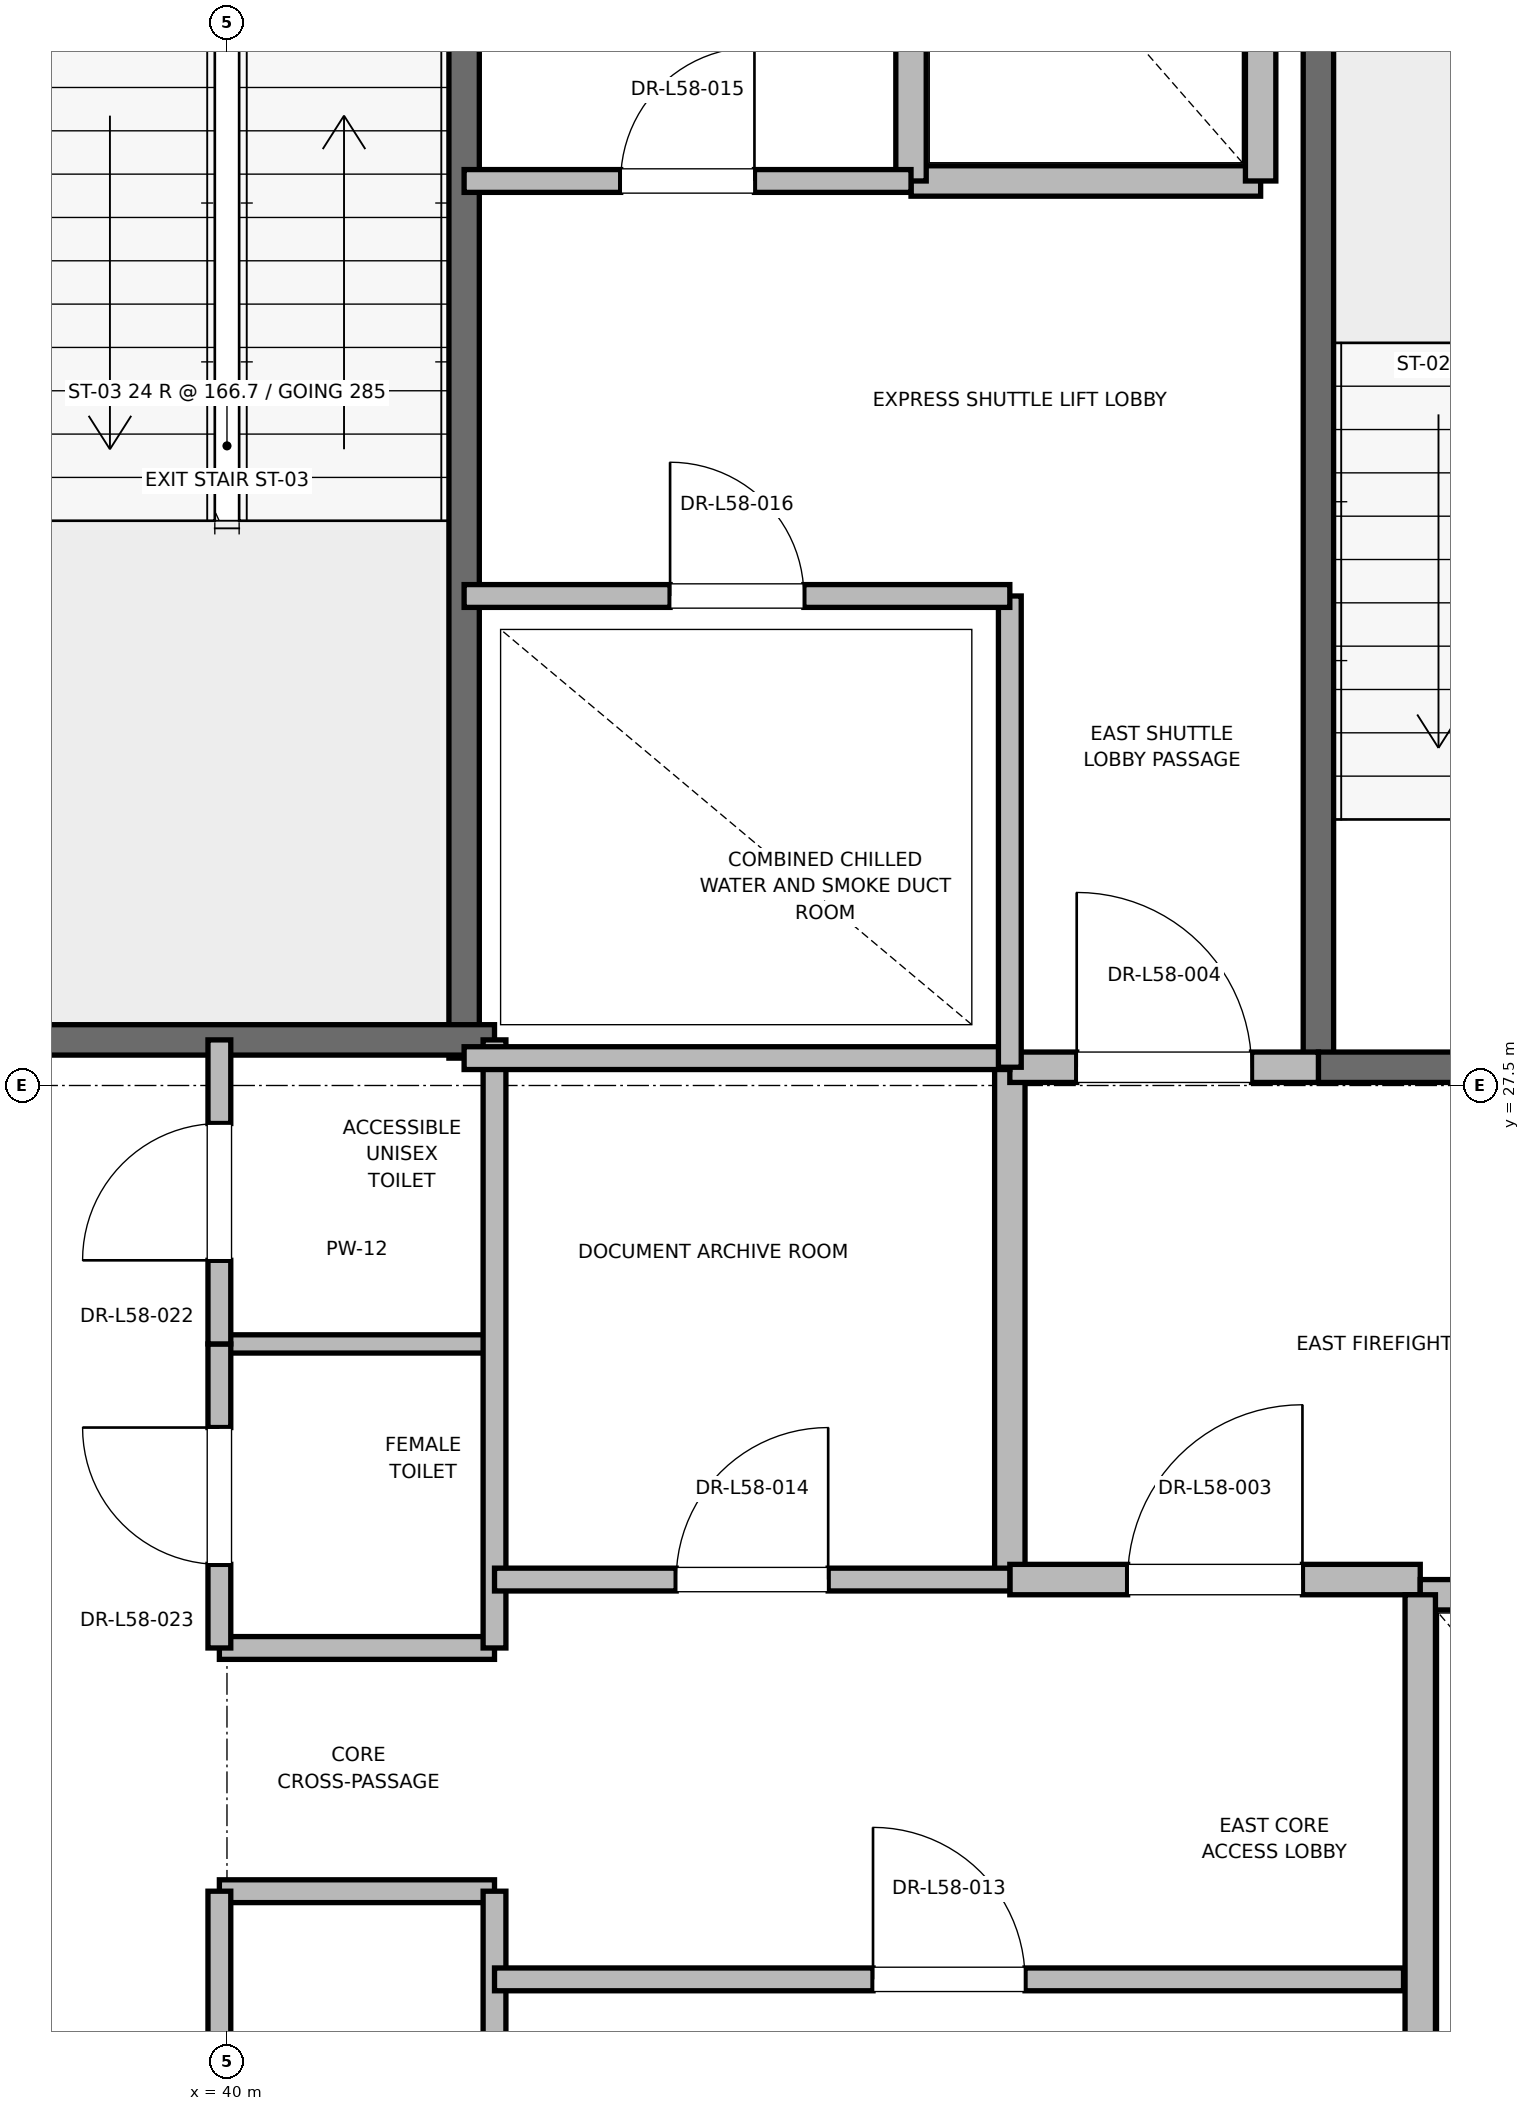
"""IFC4 building model, lengths in metres.
Left out: names, types, materials, properties, quantities, classifications, styles, units other than length and angle.
Written with IfcOpenShell. Run it as: python <this file> out.ifc"""

import sys

from ifc_helpers import new_model, si_unit, direction, frame, frame_2d, origin, place, context, subcontext, project, spatial, rectangle, extrude, element, fill, save


model = new_model("IFC4")
c1 = context("Model", 3, precision=1e-05, world=origin(), true_north=direction((0.0, 1.0)))
c2 = subcontext(c1, "Body", "Model", "MODEL_VIEW")
j1 = project(units=[si_unit("LENGTHUNIT", "METRE"), si_unit("PLANEANGLEUNIT", "RADIAN")], contexts=[c1])
p1 = place(None, origin())
s1 = spatial("IfcSite", under=j1, at=p1, CompositionType="ELEMENT")
p2 = place(p1, origin())
s2 = spatial("IfcBuilding", under=s1, at=p2, CompositionType="ELEMENT")
p3 = place(p2, frame((0.0, 0.0, 251.2)))
s3 = spatial("IfcBuildingStorey", under=s2, at=p3, CompositionType="ELEMENT", Elevation=251.2)
p4 = place(p3, frame((47.18, 27.62, 0.0), z_axis=(0.0, 0.0, 1.0), x_axis=(0.0, 1.0, 0.0)))
e1 = element("IfcWall", 1, at=p4, inside=s3, PredefinedType="SOLIDWALL", context=c2, shape_type="SweptSolid", body=[
    extrude(rectangle(XDim=8.18, YDim=0.2, at=frame_2d((4.09, 0.0))), origin(), (0.0, 0.0, 1.0), 3.785),
])
p5 = place(p3, frame((47.18, 27.62, 0.0), z_axis=(0.0, 0.0, 1.0), x_axis=(1.0, 0.0, 0.0)))
e2 = element("IfcWall", 2, at=p5, inside=s3, PredefinedType="SOLIDWALL", context=c2, shape_type="SweptSolid", body=[
    extrude(rectangle(XDim=3.12, YDim=0.2, at=frame_2d((1.56, 0.0))), origin(), (0.0, 0.0, 1.0), 3.785),
])
p6 = place(p5, frame((1.01, 0.0, 0.0)))
e3 = element("IfcOpeningElement", 3, at=p6, cuts=e2, PredefinedType="OPENING", context=c2, shape_type="SweptSolid", body=[
    extrude(rectangle(XDim=1.1, YDim=2.15, at=frame_2d((0.55, 1.075))), frame((0.0, 0.1, 0.0), z_axis=(0.0, -1.0, 0.0), x_axis=(1.0, 0.0, 0.0)), (0.0, 0.0, 1.0), 0.2),
])
p7 = place(p3, frame((41.56, 27.68, 0.0), z_axis=(0.0, 0.0, 1.0), x_axis=(0.0, 1.0, 0.0)))
e4 = element("IfcWall", 4, at=p7, inside=s3, PredefinedType="SOLIDWALL", context=c2, shape_type="SweptSolid", body=[
    extrude(rectangle(XDim=8.57, YDim=0.2, at=frame_2d((4.285, 0.0))), origin(), (0.0, 0.0, 1.0), 3.785),
])
p8 = place(p3, frame((38.44, 27.8, 0.0), z_axis=(0.0, 0.0, 1.0), x_axis=(1.0, 0.0, 0.0)))
e5 = element("IfcWall", 5, at=p8, inside=s3, PredefinedType="SOLIDWALL", context=c2, shape_type="SweptSolid", body=[
    extrude(rectangle(XDim=3.32, YDim=0.2, at=frame_2d((1.66, 0.0))), origin(), (0.0, 0.0, 1.0), 3.785),
])
p9 = place(p3, frame((45.15, 24.25, 0.0), z_axis=(0.0, 0.0, 1.0), x_axis=(0.0, 1.0, 0.0)))
e6 = element("IfcWall", 6, at=p9, inside=s3, PredefinedType="PARTITIONING", context=c2, shape_type="SweptSolid", body=[
    extrude(rectangle(XDim=3.37, YDim=0.2, at=frame_2d((1.685, 0.0))), origin(), (0.0, 0.0, 1.0), 3.785),
])
p10 = place(p3, frame((45.15, 24.25, 0.0), z_axis=(0.0, 0.0, 1.0), x_axis=(1.0, 0.0, 0.0)))
e7 = element("IfcWall", 7, at=p10, inside=s3, PredefinedType="PARTITIONING", context=c2, shape_type="SweptSolid", body=[
    extrude(rectangle(XDim=2.7, YDim=0.2, at=frame_2d((1.35, 0.0))), origin(), (0.0, 0.0, 1.0), 3.785),
])
p11 = place(p10, frame((0.775, 0.0, 0.0)))
e8 = element("IfcOpeningElement", 8, at=p11, cuts=e7, PredefinedType="OPENING", context=c2, shape_type="SweptSolid", body=[
    extrude(rectangle(XDim=1.15, YDim=2.2, at=frame_2d((0.575, 1.1))), frame((0.0, 0.1, 0.0), z_axis=(0.0, -1.0, 0.0), x_axis=(1.0, 0.0, 0.0)), (0.0, 0.0, 1.0), 0.2),
])
p12 = place(p3, frame((45.15, 27.62, 0.0), z_axis=(0.0, 0.0, 1.0), x_axis=(1.0, 0.0, 0.0)))
e9 = element("IfcWall", 9, at=p12, inside=s3, PredefinedType="PARTITIONING", context=c2, shape_type="SweptSolid", body=[
    extrude(rectangle(XDim=2.03, YDim=0.2, at=frame_2d((1.015, 0.0))), origin(), (0.0, 0.0, 1.0), 3.785),
])
p13 = place(p12, frame((0.44, 0.0, 0.0)))
e10 = element("IfcOpeningElement", 10, at=p13, cuts=e9, PredefinedType="OPENING", context=c2, shape_type="SweptSolid", body=[
    extrude(rectangle(XDim=1.15, YDim=2.2, at=frame_2d((0.575, 1.1))), frame((0.0, 0.1, 0.0), z_axis=(0.0, -1.0, 0.0), x_axis=(1.0, 0.0, 0.0)), (0.0, 0.0, 1.0), 0.2),
])
p14 = place(p3, frame((50.45, 24.15, 0.0), z_axis=(0.0, 0.0, 1.0), x_axis=(-1.0, 0.0, 0.0)))
e11 = element("IfcWall", 11, at=p14, inside=s3, PredefinedType="SOLIDWALL", context=c2, shape_type="SweptSolid", body=[
    extrude(rectangle(XDim=2.6, YDim=0.2, at=frame_2d((1.3, 0.0))), origin(), (0.0, 0.0, 1.0), 2.865),
])
p15 = place(p14, frame((0.75, 0.0, 0.0)))
e12 = element("IfcOpeningElement", 12, at=p15, cuts=e11, PredefinedType="OPENING", context=c2, shape_type="SweptSolid", body=[
    extrude(rectangle(XDim=1.1, YDim=2.2, at=frame_2d((0.55, 1.1))), frame((0.0, 0.1, 0.0), z_axis=(0.0, -1.0, 0.0), x_axis=(1.0, 0.0, 0.0)), (0.0, 0.0, 1.0), 0.2),
])
p16 = place(p3, frame((47.85, 24.15, 0.0), z_axis=(0.0, 0.0, 1.0), x_axis=(0.0, -1.0, 0.0)))
e13 = element("IfcWall", 13, at=p16, inside=s3, PredefinedType="SOLIDWALL", context=c2, shape_type="SweptSolid", body=[
    extrude(rectangle(XDim=3.0, YDim=0.2, at=frame_2d((1.5, 0.0))), origin(), (0.0, 0.0, 1.0), 3.785),
])
p17 = place(p3, frame((44.5, 33.45, 0.0), z_axis=(0.0, 0.0, 1.0), x_axis=(1.0, 0.0, 0.0)))
e14 = element("IfcWall", 14, at=p17, inside=s3, PredefinedType="SOLIDWALL", context=c2, shape_type="SweptSolid", body=[
    extrude(rectangle(XDim=2.3, YDim=0.2, at=frame_2d((1.15, 0.0))), origin(), (0.0, 0.0, 1.0), 3.785),
])
p18 = place(p3, frame((44.5, 36.05, 0.0), z_axis=(0.0, 0.0, 1.0), x_axis=(0.0, -1.0, 0.0)))
e15 = element("IfcWall", 15, at=p18, inside=s3, PredefinedType="SOLIDWALL", context=c2, shape_type="SweptSolid", body=[
    extrude(rectangle(XDim=2.6, YDim=0.2, at=frame_2d((1.3, 0.0))), origin(), (0.0, 0.0, 1.0), 2.865),
])
p19 = place(p3, frame((46.8, 33.45, 0.0), z_axis=(0.0, 0.0, 1.0), x_axis=(0.0, 1.0, 0.0)))
e16 = element("IfcWall", 16, at=p19, inside=s3, PredefinedType="SOLIDWALL", context=c2, shape_type="SweptSolid", body=[
    extrude(rectangle(XDim=2.6, YDim=0.2, at=frame_2d((1.3, 0.0))), origin(), (0.0, 0.0, 1.0), 3.785),
])
for number, where, z_axis, x_axis in (
    (17, (39.95, 22.2, 0.0), (0.0, 0.0, 1.0), (1.0, 0.0, 0.0)),
    (18, (39.95, 23.8, 0.0), (0.0, 0.0, 1.0), (1.0, 0.0, 0.0)),
):
    element("IfcWall", number, at=place(p3, frame(where, z_axis=z_axis, x_axis=x_axis)), inside=s3, PredefinedType="PARTITIONING", context=c2, shape_type="SweptSolid", body=[
        extrude(rectangle(XDim=1.81, YDim=0.15, at=frame_2d((0.905, 0.0))), origin(), (0.0, 0.0, 1.0), 2.85),
    ])
p20 = place(p3, frame((39.95, 25.8, 0.0), z_axis=(0.0, 0.0, 1.0), x_axis=(1.0, 0.0, 0.0)))
e19 = element("IfcWall", 19, at=p20, inside=s3, PredefinedType="PARTITIONING", context=c2, shape_type="SweptSolid", body=[
    extrude(rectangle(XDim=1.81, YDim=0.12, at=frame_2d((0.905, 0.0))), origin(), (0.0, 0.0, 1.0), 2.85),
])
p21 = place(p3, frame((41.76, 18.6, 0.0), z_axis=(0.0, 0.0, 1.0), x_axis=(0.0, 1.0, 0.0)))
e20 = element("IfcWall", 20, at=p21, inside=s3, PredefinedType="PARTITIONING", context=c2, shape_type="SweptSolid", body=[
    extrude(rectangle(XDim=3.6, YDim=0.15, at=frame_2d((1.8, 0.0))), origin(), (0.0, 0.0, 1.0), 2.85),
])
p22 = place(p3, frame((41.76, 23.8, 0.0), z_axis=(0.0, 0.0, 1.0), x_axis=(0.0, 1.0, 0.0)))
e21 = element("IfcWall", 21, at=p22, inside=s3, PredefinedType="PARTITIONING", context=c2, shape_type="SweptSolid", body=[
    extrude(rectangle(XDim=4.0, YDim=0.15, at=frame_2d((2.0, 0.0))), origin(), (0.0, 0.0, 1.0), 2.85),
])
p23 = place(p3, frame((39.95, 19.2, 0.0), z_axis=(0.0, 0.0, 1.0), x_axis=(0.0, 1.0, 0.0)))
e22 = element("IfcWall", 22, at=p23, inside=s3, PredefinedType="PARTITIONING", context=c2, shape_type="SweptSolid", body=[
    extrude(rectangle(XDim=3.0, YDim=0.15, at=frame_2d((1.5, 0.0))), origin(), (0.0, 0.0, 1.0), 2.85),
])
p24 = place(p23, frame((1.05, 0.0, 0.0)))
e23 = element("IfcOpeningElement", 23, at=p24, cuts=e22, PredefinedType="OPENING", context=c2, shape_type="SweptSolid", body=[
    extrude(rectangle(XDim=0.9, YDim=2.1, at=frame_2d((0.45, 1.05))), frame((0.0, 0.075, 0.0), z_axis=(0.0, -1.0, 0.0), x_axis=(1.0, 0.0, 0.0)), (0.0, 0.0, 1.0), 0.15),
])
p25 = place(p3, frame((39.95, 23.8, 0.0), z_axis=(0.0, 0.0, 1.0), x_axis=(0.0, 1.0, 0.0)))
e24 = element("IfcWall", 24, at=p25, inside=s3, PredefinedType="PARTITIONING", context=c2, shape_type="SweptSolid", body=[
    extrude(rectangle(XDim=2.0, YDim=0.15, at=frame_2d((1.0, 0.0))), origin(), (0.0, 0.0, 1.0), 2.85),
])
p26 = place(p25, frame((0.55, 0.0, 0.0)))
e25 = element("IfcOpeningElement", 25, at=p26, cuts=e24, PredefinedType="OPENING", context=c2, shape_type="SweptSolid", body=[
    extrude(rectangle(XDim=0.9, YDim=2.1, at=frame_2d((0.45, 1.05))), frame((0.0, 0.075, 0.0), z_axis=(0.0, -1.0, 0.0), x_axis=(1.0, 0.0, 0.0)), (0.0, 0.0, 1.0), 0.15),
])
p27 = place(p3, frame((39.95, 25.8, 0.0), z_axis=(0.0, 0.0, 1.0), x_axis=(0.0, 1.0, 0.0)))
e26 = element("IfcWall", 26, at=p27, inside=s3, PredefinedType="PARTITIONING", context=c2, shape_type="SweptSolid", body=[
    extrude(rectangle(XDim=2.0, YDim=0.15, at=frame_2d((1.0, 0.0))), origin(), (0.0, 0.0, 1.0), 2.85),
])
p28 = place(p27, frame((0.55, 0.0, 0.0)))
e27 = element("IfcOpeningElement", 27, at=p28, cuts=e26, PredefinedType="OPENING", context=c2, shape_type="SweptSolid", body=[
    extrude(rectangle(XDim=0.9, YDim=2.1, at=frame_2d((0.45, 1.05))), frame((0.0, 0.075, 0.0), z_axis=(0.0, -1.0, 0.0), x_axis=(1.0, 0.0, 0.0)), (0.0, 0.0, 1.0), 0.15),
])
p29 = place(p3, frame((41.56, 27.68, 0.0), z_axis=(0.0, 0.0, 1.0), x_axis=(1.0, 0.0, 0.0)))
e28 = element("IfcWall", 28, at=p29, inside=s3, PredefinedType="PARTITIONING", context=c2, shape_type="SweptSolid", body=[
    extrude(rectangle(XDim=3.59, YDim=0.15, at=frame_2d((1.795, 0.0))), origin(), (0.0, 0.0, 1.0), 2.85),
])
p30 = place(p3, frame((41.76, 21.62, 0.0), z_axis=(0.0, 0.0, 1.0), x_axis=(1.0, 0.0, 0.0)))
e29 = element("IfcWall", 29, at=p30, inside=s3, PredefinedType="PARTITIONING", context=c2, shape_type="SweptSolid", body=[
    extrude(rectangle(XDim=5.98, YDim=0.15, at=frame_2d((2.99, 0.0))), origin(), (0.0, 0.0, 1.0), 2.85),
])
p31 = place(p30, frame((2.49, 0.0, 0.0)))
e30 = element("IfcOpeningElement", 30, at=p31, cuts=e29, PredefinedType="OPENING", context=c2, shape_type="SweptSolid", body=[
    extrude(rectangle(XDim=1.0, YDim=2.15, at=frame_2d((0.5, 1.075))), frame((0.0, 0.075, 0.0), z_axis=(0.0, -1.0, 0.0), x_axis=(1.0, 0.0, 0.0)), (0.0, 0.0, 1.0), 0.15),
])
p32 = place(p3, frame((41.76, 24.25, 0.0), z_axis=(0.0, 0.0, 1.0), x_axis=(1.0, 0.0, 0.0)))
e31 = element("IfcWall", 31, at=p32, inside=s3, PredefinedType="PARTITIONING", context=c2, shape_type="SweptSolid", body=[
    extrude(rectangle(XDim=3.39, YDim=0.15, at=frame_2d((1.695, 0.0))), origin(), (0.0, 0.0, 1.0), 2.85),
])
p33 = place(p32, frame((1.195, 0.0, 0.0)))
e32 = element("IfcOpeningElement", 32, at=p33, cuts=e31, PredefinedType="OPENING", context=c2, shape_type="SweptSolid", body=[
    extrude(rectangle(XDim=1.0, YDim=2.15, at=frame_2d((0.5, 1.075))), frame((0.0, 0.075, 0.0), z_axis=(0.0, -1.0, 0.0), x_axis=(1.0, 0.0, 0.0)), (0.0, 0.0, 1.0), 0.15),
])
p34 = place(p3, frame((45.15, 27.62, 0.0), z_axis=(0.0, 0.0, 1.0), x_axis=(0.0, 1.0, 0.0)))
e33 = element("IfcWall", 33, at=p34, inside=s3, PredefinedType="PARTITIONING", context=c2, shape_type="SweptSolid", body=[
    extrude(rectangle(XDim=3.1, YDim=0.15, at=frame_2d((1.55, 0.0))), origin(), (0.0, 0.0, 1.0), 2.85),
])
p35 = place(p3, frame((41.56, 30.72, 0.0), z_axis=(0.0, 0.0, 1.0), x_axis=(1.0, 0.0, 0.0)))
e34 = element("IfcWall", 34, at=p35, inside=s3, PredefinedType="PARTITIONING", context=c2, shape_type="SweptSolid", body=[
    extrude(rectangle(XDim=3.59, YDim=0.15, at=frame_2d((1.795, 0.0))), origin(), (0.0, 0.0, 1.0), 2.85),
])
p36 = place(p35, frame((1.355, 0.0, 0.0)))
e35 = element("IfcOpeningElement", 35, at=p36, cuts=e34, PredefinedType="OPENING", context=c2, shape_type="SweptSolid", body=[
    extrude(rectangle(XDim=0.88, YDim=2.1, at=frame_2d((0.44, 1.05))), frame((0.0, 0.075, 0.0), z_axis=(0.0, -1.0, 0.0), x_axis=(1.0, 0.0, 0.0)), (0.0, 0.0, 1.0), 0.15),
])
p37 = place(p3, frame((41.56, 33.45, 0.0), z_axis=(0.0, 0.0, 1.0), x_axis=(1.0, 0.0, 0.0)))
e36 = element("IfcWall", 36, at=p37, inside=s3, PredefinedType="PARTITIONING", context=c2, shape_type="SweptSolid", body=[
    extrude(rectangle(XDim=2.94, YDim=0.15, at=frame_2d((1.47, 0.0))), origin(), (0.0, 0.0, 1.0), 2.85),
])
p38 = place(p37, frame((1.03, 0.0, 0.0)))
e37 = element("IfcOpeningElement", 37, at=p38, cuts=e36, PredefinedType="OPENING", context=c2, shape_type="SweptSolid", body=[
    extrude(rectangle(XDim=0.88, YDim=2.1, at=frame_2d((0.44, 1.05))), frame((0.0, 0.075, 0.0), z_axis=(0.0, -1.0, 0.0), x_axis=(1.0, 0.0, 0.0)), (0.0, 0.0, 1.0), 0.15),
])
p39 = place(p11, origin())
e38 = element("IfcDoor", 38, at=p39, inside=s3, OperationType="SINGLE_SWING_RIGHT", PredefinedType="DOOR", context=c2, shape_type="SweptSolid", body=[
    extrude(rectangle(XDim=1.15, YDim=2.2, at=frame_2d((0.575, 1.1))), frame((0.0, 0.025, 0.0), z_axis=(0.0, -1.0, 0.0), x_axis=(1.0, 0.0, 0.0)), (0.0, 0.0, 1.0), 0.05),
])
fill(e8, e38)
p40 = place(p13, origin())
e39 = element("IfcDoor", 39, at=p40, inside=s3, OperationType="SINGLE_SWING_LEFT", PredefinedType="DOOR", context=c2, shape_type="SweptSolid", body=[
    extrude(rectangle(XDim=1.15, YDim=2.2, at=frame_2d((0.575, 1.1))), frame((0.0, 0.025, 0.0), z_axis=(0.0, -1.0, 0.0), x_axis=(1.0, 0.0, 0.0)), (0.0, 0.0, 1.0), 0.05),
])
fill(e10, e39)
p41 = place(p26, origin())
e40 = element("IfcDoor", 40, at=p41, inside=s3, OperationType="SINGLE_SWING_RIGHT", PredefinedType="DOOR", context=c2, shape_type="SweptSolid", body=[
    extrude(rectangle(XDim=0.9, YDim=2.1, at=frame_2d((0.45, 1.05))), frame((0.0, 0.025, 0.0), z_axis=(0.0, -1.0, 0.0), x_axis=(1.0, 0.0, 0.0)), (0.0, 0.0, 1.0), 0.05),
])
fill(e25, e40)
p42 = place(p28, origin())
e41 = element("IfcDoor", 41, at=p42, inside=s3, OperationType="SINGLE_SWING_LEFT", PredefinedType="DOOR", context=c2, shape_type="SweptSolid", body=[
    extrude(rectangle(XDim=0.9, YDim=2.1, at=frame_2d((0.45, 1.05))), frame((0.0, 0.025, 0.0), z_axis=(0.0, -1.0, 0.0), x_axis=(1.0, 0.0, 0.0)), (0.0, 0.0, 1.0), 0.05),
])
fill(e27, e41)
p43 = place(p31, origin())
e42 = element("IfcDoor", 42, at=p43, inside=s3, OperationType="SINGLE_SWING_LEFT", PredefinedType="DOOR", context=c2, shape_type="SweptSolid", body=[
    extrude(rectangle(XDim=1.0, YDim=2.15, at=frame_2d((0.5, 1.075))), frame((0.0, 0.025, 0.0), z_axis=(0.0, -1.0, 0.0), x_axis=(1.0, 0.0, 0.0)), (0.0, 0.0, 1.0), 0.05),
])
fill(e30, e42)
p44 = place(p33, origin())
e43 = element("IfcDoor", 43, at=p44, inside=s3, OperationType="SINGLE_SWING_RIGHT", PredefinedType="DOOR", context=c2, shape_type="SweptSolid", body=[
    extrude(rectangle(XDim=1.0, YDim=2.15, at=frame_2d((0.5, 1.075))), frame((0.0, 0.025, 0.0), z_axis=(0.0, -1.0, 0.0), x_axis=(1.0, 0.0, 0.0)), (0.0, 0.0, 1.0), 0.05),
])
fill(e32, e43)
p45 = place(p36, origin())
e44 = element("IfcDoor", 44, at=p45, inside=s3, OperationType="SINGLE_SWING_LEFT", PredefinedType="DOOR", context=c2, shape_type="SweptSolid", body=[
    extrude(rectangle(XDim=0.88, YDim=2.1, at=frame_2d((0.44, 1.05))), frame((0.0, 0.025, 0.0), z_axis=(0.0, -1.0, 0.0), x_axis=(1.0, 0.0, 0.0)), (0.0, 0.0, 1.0), 0.05),
])
fill(e35, e44)
p46 = place(p38, origin())
e45 = element("IfcDoor", 45, at=p46, inside=s3, OperationType="SINGLE_SWING_RIGHT", PredefinedType="DOOR", context=c2, shape_type="SweptSolid", body=[
    extrude(rectangle(XDim=0.88, YDim=2.1, at=frame_2d((0.44, 1.05))), frame((0.0, 0.025, 0.0), z_axis=(0.0, -1.0, 0.0), x_axis=(1.0, 0.0, 0.0)), (0.0, 0.0, 1.0), 0.05),
])
fill(e37, e45)
save(model, sys.argv[1])
